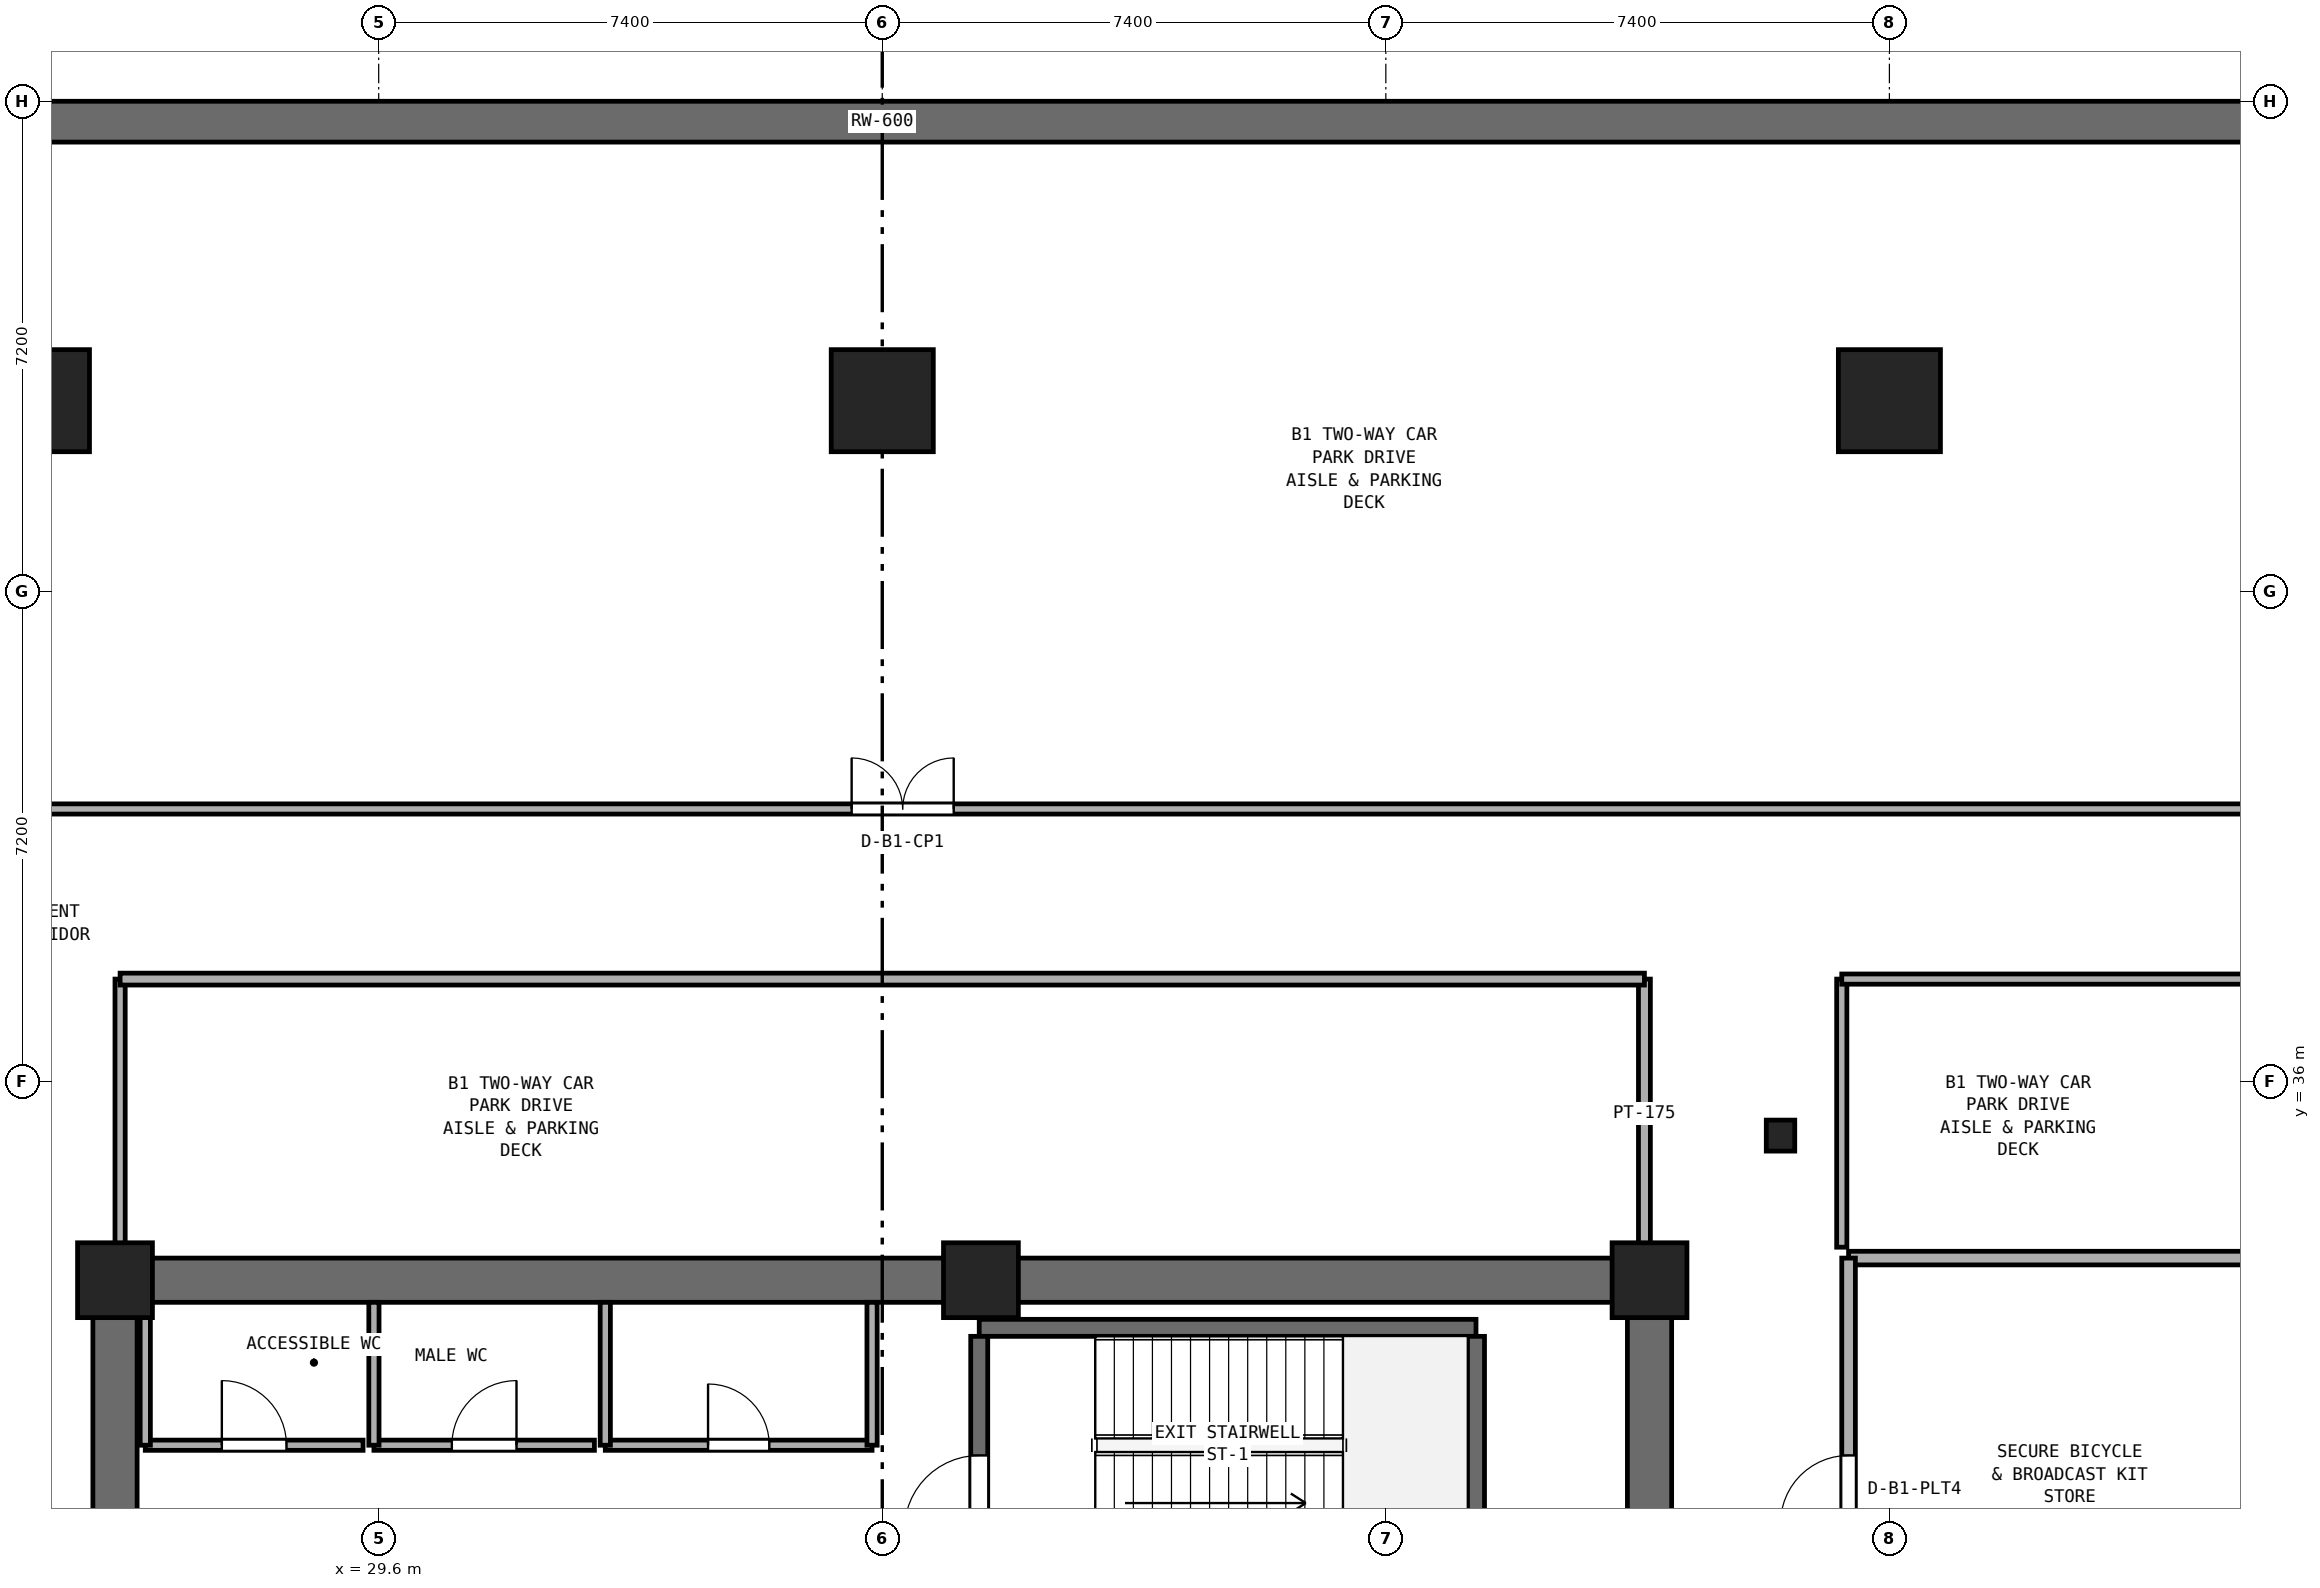
"""IFC4 building model, lengths in metres.
Left out: names, types, materials, properties, quantities, classifications, styles, units other than length and angle.
Written with IfcOpenShell. Run it as: python <this file> out.ifc"""

import sys

from ifc_helpers import new_model, si_unit, direction, frame, frame_2d, origin, origin_2d, place, context, subcontext, project, spatial, rectangle, i_section, extrude, element, fill, save


model = new_model("IFC4")
c1 = context("Model", 3, precision=1e-05, world=origin(), true_north=direction((0.0, 1.0)))
c2 = subcontext(c1, "Body", "Model", "MODEL_VIEW")
j1 = project(units=[si_unit("LENGTHUNIT", "METRE"), si_unit("PLANEANGLEUNIT", "RADIAN")], contexts=[c1])
p1 = place(None, origin())
s1 = spatial("IfcSite", under=j1, at=p1, CompositionType="ELEMENT")
p2 = place(p1, origin())
s2 = spatial("IfcBuilding", under=s1, at=p2, CompositionType="ELEMENT")
p3 = place(p2, frame((0.0, 0.0, -4.8)))
s3 = spatial("IfcBuildingStorey", under=s2, at=p3, CompositionType="ELEMENT", Elevation=-4.8)
p4 = place(p3, frame((25.4, 33.075, 0.0), z_axis=(0.0, 0.0, 1.0), x_axis=(1.0, 0.0, 0.0)))
e1 = element("IfcWall", 1, at=p4, inside=s3, PredefinedType="SHEAR", context=c2, shape_type="SweptSolid", body=[
    extrude(rectangle(XDim=23.2, YDim=0.65, at=frame_2d((11.6, 0.0))), origin(), (0.0, 0.0, 1.0), 4.45),
])
p5 = place(p3, frame((25.725, 17.65, 0.0), z_axis=(0.0, 0.0, 1.0), x_axis=(0.0, 1.0, 0.0)))
e2 = element("IfcWall", 2, at=p5, inside=s3, PredefinedType="SHEAR", context=c2, shape_type="SweptSolid", body=[
    extrude(rectangle(XDim=15.1, YDim=0.65, at=frame_2d((7.55, 0.0))), origin(), (0.0, 0.0, 1.0), 4.45),
])
p6 = place(p5, frame((6.8, 0.0, 0.0)))
e3 = element("IfcOpeningElement", 3, at=p6, cuts=e2, PredefinedType="OPENING", context=c2, shape_type="SweptSolid", body=[
    extrude(rectangle(XDim=1.5, YDim=2.15, at=frame_2d((0.75, 1.075))), frame((0.0, 0.335, 0.0), z_axis=(0.0, -1.0, 0.0), x_axis=(1.0, 0.0, 0.0)), (0.0, 0.0, 1.0), 0.67),
])
p7 = place(p3, frame((48.275, 17.65, 0.0), z_axis=(0.0, 0.0, 1.0), x_axis=(0.0, 1.0, 0.0)))
e4 = element("IfcWall", 4, at=p7, inside=s3, PredefinedType="SHEAR", context=c2, shape_type="SweptSolid", body=[
    extrude(rectangle(XDim=15.1, YDim=0.65, at=frame_2d((7.55, 0.0))), origin(), (0.0, 0.0, 1.0), 4.45),
])
p8 = place(p7, frame((5.65, 0.0, 0.0)))
e5 = element("IfcOpeningElement", 5, at=p8, cuts=e4, PredefinedType="OPENING", context=c2, shape_type="SweptSolid", body=[
    extrude(rectangle(XDim=1.5, YDim=2.15, at=frame_2d((0.75, 1.075))), frame((0.0, 0.335, 0.0), z_axis=(0.0, -1.0, 0.0), x_axis=(1.0, 0.0, 0.0)), (0.0, 0.0, 1.0), 0.67),
])
p9 = place(p3, frame((0.0, 50.1, 0.0), z_axis=(0.0, 0.0, 1.0), x_axis=(1.0, 0.0, 0.0)))
e6 = element("IfcWall", 6, at=p9, inside=s3, PredefinedType="SOLIDWALL", context=c2, shape_type="SweptSolid", body=[
    extrude(rectangle(XDim=74.0, YDim=0.6, at=frame_2d((37.0, 0.0))), origin(), (0.0, 0.0, 1.0), 4.45),
])
for number, where, z_axis, x_axis in (
    (7, (48.275, 33.075, 0.0), (0.0, 0.0, 1.0), (1.0, 0.0, 0.0)),
    (8, (38.45, 33.075, 0.0), (0.0, 0.0, 1.0), (1.0, 0.0, 0.0)),
    (9, (25.725, 33.075, 0.0), (0.0, 0.0, 1.0), (1.0, 0.0, 0.0)),
):
    element("IfcColumn", number, at=place(p3, frame(where, z_axis=z_axis, x_axis=x_axis)), inside=s3, PredefinedType="PILASTER", context=c2, shape_type="SweptSolid", body=[
        extrude(rectangle(XDim=1.1, YDim=1.1, at=origin_2d()), origin(), (0.0, 0.0, 1.0), 4.8),
    ])
for number, where, z_axis, x_axis in (
    (10, (24.6, 46.0, 0.0), (0.0, 0.0, 1.0), (1.0, 0.0, 0.0)),
    (11, (37.0, 46.0, 0.0), (0.0, 0.0, 1.0), (1.0, 0.0, 0.0)),
    (12, (51.8, 46.0, 0.0), (0.0, 0.0, 1.0), (1.0, 0.0, 0.0)),
):
    element("IfcColumn", number, at=place(p3, frame(where, z_axis=z_axis, x_axis=x_axis)), inside=s3, PredefinedType="COLUMN", context=c2, shape_type="SweptSolid", body=[
        extrude(rectangle(XDim=1.5, YDim=1.5, at=origin_2d()), origin(), (0.0, 0.0, 1.0), 4.8),
    ])
p10 = place(p3, frame((50.2, 35.2, 0.0), z_axis=(0.0, 0.0, 1.0), x_axis=(1.0, 0.0, 0.0)))
e13 = element("IfcColumn", 13, at=p10, inside=s3, PredefinedType="COLUMN", context=c2, shape_type="SweptSolid", body=[
    extrude(i_section(OverallWidth=0.418, OverallDepth=0.456, WebThickness=0.042, FlangeThickness=0.067, at=origin_2d()), origin(), (0.0, 0.0, 1.0), 4.8),
])
p11 = place(p3, frame((38.425, 32.375, 0.0), z_axis=(0.0, 0.0, 1.0), x_axis=(1.0, 0.0, 0.0)))
e14 = element("IfcWall", 14, at=p11, inside=s3, PredefinedType="SHEAR", context=c2, shape_type="SweptSolid", body=[
    extrude(rectangle(XDim=7.3, YDim=0.25, at=frame_2d((3.65, 0.0))), origin(), (0.0, 0.0, 1.0), 4.45),
])
p12 = place(p3, frame((38.425, 29.05, 0.0), z_axis=(0.0, 0.0, 1.0), x_axis=(0.0, 1.0, 0.0)))
e15 = element("IfcWall", 15, at=p12, inside=s3, PredefinedType="SHEAR", context=c2, shape_type="SweptSolid", body=[
    extrude(rectangle(XDim=3.2, YDim=0.25, at=frame_2d((1.6, 0.0))), origin(), (0.0, 0.0, 1.0), 4.45),
])
p13 = place(p12, frame((0.35, 0.0, 0.0)))
e16 = element("IfcOpeningElement", 16, at=p13, cuts=e15, PredefinedType="OPENING", context=c2, shape_type="SweptSolid", body=[
    extrude(rectangle(XDim=1.1, YDim=2.15, at=frame_2d((0.55, 1.075))), frame((0.0, 0.135, 0.0), z_axis=(0.0, -1.0, 0.0), x_axis=(1.0, 0.0, 0.0)), (0.0, 0.0, 1.0), 0.27),
])
p14 = place(p3, frame((45.725, 29.05, 0.0), z_axis=(0.0, 0.0, 1.0), x_axis=(0.0, 1.0, 0.0)))
e17 = element("IfcWall", 17, at=p14, inside=s3, PredefinedType="SHEAR", context=c2, shape_type="SweptSolid", body=[
    extrude(rectangle(XDim=3.2, YDim=0.25, at=frame_2d((1.6, 0.0))), origin(), (0.0, 0.0, 1.0), 4.45),
])
p15 = place(p3, frame((26.17, 30.65, 0.0), z_axis=(0.0, 0.0, 1.0), x_axis=(1.0, 0.0, 0.0)))
e18 = element("IfcWall", 18, at=p15, inside=s3, PredefinedType="PARTITIONING", context=c2, shape_type="SweptSolid", body=[
    extrude(rectangle(XDim=3.2, YDim=0.15, at=frame_2d((1.6, 0.0))), origin(), (0.0, 0.0, 1.0), 4.45),
])
p16 = place(p15, frame((1.125, 0.0, 0.0)))
e19 = element("IfcOpeningElement", 19, at=p16, cuts=e18, PredefinedType="OPENING", context=c2, shape_type="SweptSolid", body=[
    extrude(rectangle(XDim=0.95, YDim=2.1, at=frame_2d((0.475, 1.05))), frame((0.0, 0.085, 0.0), z_axis=(0.0, -1.0, 0.0), x_axis=(1.0, 0.0, 0.0)), (0.0, 0.0, 1.0), 0.17),
])
p17 = place(p3, frame((26.17, 30.65, 0.0), z_axis=(0.0, 0.0, 1.0), x_axis=(0.0, 1.0, 0.0)))
e20 = element("IfcWall", 20, at=p17, inside=s3, PredefinedType="PARTITIONING", context=c2, shape_type="SweptSolid", body=[
    extrude(rectangle(XDim=2.1, YDim=0.15, at=frame_2d((1.05, 0.0))), origin(), (0.0, 0.0, 1.0), 4.45),
])
p18 = place(p3, frame((29.53, 30.65, 0.0), z_axis=(0.0, 0.0, 1.0), x_axis=(1.0, 0.0, 0.0)))
e21 = element("IfcWall", 21, at=p18, inside=s3, PredefinedType="PARTITIONING", context=c2, shape_type="SweptSolid", body=[
    extrude(rectangle(XDim=3.24, YDim=0.15, at=frame_2d((1.62, 0.0))), origin(), (0.0, 0.0, 1.0), 4.45),
])
p19 = place(p18, frame((1.145, 0.0, 0.0)))
e22 = element("IfcOpeningElement", 22, at=p19, cuts=e21, PredefinedType="OPENING", context=c2, shape_type="SweptSolid", body=[
    extrude(rectangle(XDim=0.95, YDim=2.1, at=frame_2d((0.475, 1.05))), frame((0.0, 0.085, 0.0), z_axis=(0.0, -1.0, 0.0), x_axis=(1.0, 0.0, 0.0)), (0.0, 0.0, 1.0), 0.17),
])
p20 = place(p3, frame((29.53, 30.65, 0.0), z_axis=(0.0, 0.0, 1.0), x_axis=(0.0, 1.0, 0.0)))
e23 = element("IfcWall", 23, at=p20, inside=s3, PredefinedType="PARTITIONING", context=c2, shape_type="SweptSolid", body=[
    extrude(rectangle(XDim=2.1, YDim=0.15, at=frame_2d((1.05, 0.0))), origin(), (0.0, 0.0, 1.0), 4.45),
])
p21 = place(p3, frame((32.93, 30.65, 0.0), z_axis=(0.0, 0.0, 1.0), x_axis=(1.0, 0.0, 0.0)))
e24 = element("IfcWall", 24, at=p21, inside=s3, PredefinedType="PARTITIONING", context=c2, shape_type="SweptSolid", body=[
    extrude(rectangle(XDim=3.92, YDim=0.15, at=frame_2d((1.96, 0.0))), origin(), (0.0, 0.0, 1.0), 4.45),
])
p22 = place(p21, frame((1.51, 0.0, 0.0)))
e25 = element("IfcOpeningElement", 25, at=p22, cuts=e24, PredefinedType="OPENING", context=c2, shape_type="SweptSolid", body=[
    extrude(rectangle(XDim=0.9, YDim=2.1, at=frame_2d((0.45, 1.05))), frame((0.0, 0.085, 0.0), z_axis=(0.0, -1.0, 0.0), x_axis=(1.0, 0.0, 0.0)), (0.0, 0.0, 1.0), 0.17),
])
for number, where, z_axis, x_axis in (
    (26, (32.93, 30.65, 0.0), (0.0, 0.0, 1.0), (0.0, 1.0, 0.0)),
    (27, (36.85, 30.65, 0.0), (0.0, 0.0, 1.0), (0.0, 1.0, 0.0)),
):
    element("IfcWall", number, at=place(p3, frame(where, z_axis=z_axis, x_axis=x_axis)), inside=s3, PredefinedType="PARTITIONING", context=c2, shape_type="SweptSolid", body=[
        extrude(rectangle(XDim=2.1, YDim=0.15, at=frame_2d((1.05, 0.0))), origin(), (0.0, 0.0, 1.0), 4.45),
    ])
p23 = place(p3, frame((51.2, 33.4, 0.0), z_axis=(0.0, 0.0, 1.0), x_axis=(1.0, 0.0, 0.0)))
e28 = element("IfcWall", 28, at=p23, inside=s3, PredefinedType="SOLIDWALL", context=c2, shape_type="SweptSolid", body=[
    extrude(rectangle(XDim=6.0, YDim=0.2, at=frame_2d((3.0, 0.0))), origin(), (0.0, 0.0, 1.0), 4.45),
])
p24 = place(p3, frame((51.2, 27.0, 0.0), z_axis=(0.0, 0.0, 1.0), x_axis=(0.0, 1.0, 0.0)))
e29 = element("IfcWall", 29, at=p24, inside=s3, PredefinedType="SOLIDWALL", context=c2, shape_type="SweptSolid", body=[
    extrude(rectangle(XDim=6.4, YDim=0.2, at=frame_2d((3.2, 0.0))), origin(), (0.0, 0.0, 1.0), 4.45),
])
p25 = place(p24, frame((2.5, 0.0, 0.0)))
e30 = element("IfcOpeningElement", 30, at=p25, cuts=e29, PredefinedType="OPENING", context=c2, shape_type="SweptSolid", body=[
    extrude(rectangle(XDim=1.0, YDim=2.12, at=frame_2d((0.5, 1.06))), frame((0.0, 0.11, 0.0), z_axis=(0.0, -1.0, 0.0), x_axis=(1.0, 0.0, 0.0)), (0.0, 0.0, 1.0), 0.22),
])
p26 = place(p3, frame((51.1, 33.56, 0.0), z_axis=(0.0, 0.0, 1.0), x_axis=(0.0, 1.0, 0.0)))
e31 = element("IfcWall", 31, at=p26, inside=s3, PredefinedType="PARTITIONING", context=c2, shape_type="SweptSolid", body=[
    extrude(rectangle(XDim=3.94, YDim=0.15, at=frame_2d((1.97, 0.0))), origin(), (0.0, 0.0, 1.0), 4.45),
])
p27 = place(p3, frame((48.2, 33.54, 0.0), z_axis=(0.0, 0.0, 1.0), x_axis=(0.0, 1.0, 0.0)))
e32 = element("IfcWall", 32, at=p27, inside=s3, PredefinedType="PARTITIONING", context=c2, shape_type="SweptSolid", body=[
    extrude(rectangle(XDim=3.96, YDim=0.175, at=frame_2d((1.98, 0.0))), origin(), (0.0, 0.0, 1.0), 4.45),
])
p28 = place(p3, frame((25.8, 33.54, 0.0), z_axis=(0.0, 0.0, 1.0), x_axis=(0.0, 1.0, 0.0)))
e33 = element("IfcWall", 33, at=p28, inside=s3, PredefinedType="PARTITIONING", context=c2, shape_type="SweptSolid", body=[
    extrude(rectangle(XDim=3.96, YDim=0.15, at=frame_2d((1.98, 0.0))), origin(), (0.0, 0.0, 1.0), 4.45),
])
p29 = place(p3, frame((25.8, 37.5, 0.0), z_axis=(0.0, 0.0, 1.0), x_axis=(1.0, 0.0, 0.0)))
e34 = element("IfcWall", 34, at=p29, inside=s3, PredefinedType="PARTITIONING", context=c2, shape_type="SweptSolid", body=[
    extrude(rectangle(XDim=22.4, YDim=0.175, at=frame_2d((11.2, 0.0))), origin(), (0.0, 0.0, 1.0), 4.45),
])
p30 = place(p3, frame((51.1, 37.5, 0.0), z_axis=(0.0, 0.0, 1.0), x_axis=(1.0, 0.0, 0.0)))
e35 = element("IfcWall", 35, at=p30, inside=s3, PredefinedType="PARTITIONING", context=c2, shape_type="SweptSolid", body=[
    extrude(rectangle(XDim=22.695, YDim=0.15, at=frame_2d((11.347, 0.0))), origin(), (0.0, 0.0, 1.0), 4.45),
])
p31 = place(p3, frame((8.46, 40.0, 0.0), z_axis=(0.0, 0.0, 1.0), x_axis=(1.0, 0.0, 0.0)))
e36 = element("IfcWall", 36, at=p31, inside=s3, PredefinedType="PARTITIONING", context=c2, shape_type="SweptSolid", body=[
    extrude(rectangle(XDim=57.68, YDim=0.15, at=frame_2d((28.84, 0.0))), origin(), (0.0, 0.0, 1.0), 4.45),
])
p32 = place(p31, frame((28.09, 0.0, 0.0)))
e37 = element("IfcOpeningElement", 37, at=p32, cuts=e36, PredefinedType="OPENING", context=c2, shape_type="SweptSolid", body=[
    extrude(rectangle(XDim=1.5, YDim=2.15, at=frame_2d((0.75, 1.075))), frame((0.0, 0.085, 0.0), z_axis=(0.0, -1.0, 0.0), x_axis=(1.0, 0.0, 0.0)), (0.0, 0.0, 1.0), 0.17),
])
p33 = place(p13, origin())
e38 = element("IfcDoor", 38, at=p33, inside=s3, OperationType="SINGLE_SWING_LEFT", PredefinedType="DOOR", context=c2, shape_type="SweptSolid", body=[
    extrude(rectangle(XDim=1.1, YDim=2.15, at=frame_2d((0.55, 1.075))), frame((0.0, 0.025, 0.0), z_axis=(0.0, -1.0, 0.0), x_axis=(1.0, 0.0, 0.0)), (0.0, 0.0, 1.0), 0.05),
])
fill(e16, e38)
p34 = place(p16, origin())
e39 = element("IfcDoor", 39, at=p34, inside=s3, OperationType="SINGLE_SWING_LEFT", PredefinedType="DOOR", context=c2, shape_type="SweptSolid", body=[
    extrude(rectangle(XDim=0.95, YDim=2.1, at=frame_2d((0.475, 1.05))), frame((0.0, 0.025, 0.0), z_axis=(0.0, -1.0, 0.0), x_axis=(1.0, 0.0, 0.0)), (0.0, 0.0, 1.0), 0.05),
])
fill(e19, e39)
p35 = place(p19, origin())
e40 = element("IfcDoor", 40, at=p35, inside=s3, OperationType="SINGLE_SWING_RIGHT", PredefinedType="DOOR", context=c2, shape_type="SweptSolid", body=[
    extrude(rectangle(XDim=0.95, YDim=2.1, at=frame_2d((0.475, 1.05))), frame((0.0, 0.025, 0.0), z_axis=(0.0, -1.0, 0.0), x_axis=(1.0, 0.0, 0.0)), (0.0, 0.0, 1.0), 0.05),
])
fill(e22, e40)
p36 = place(p22, origin())
e41 = element("IfcDoor", 41, at=p36, inside=s3, OperationType="SINGLE_SWING_LEFT", PredefinedType="DOOR", context=c2, shape_type="SweptSolid", body=[
    extrude(rectangle(XDim=0.9, YDim=2.1, at=frame_2d((0.45, 1.05))), frame((0.0, 0.025, 0.0), z_axis=(0.0, -1.0, 0.0), x_axis=(1.0, 0.0, 0.0)), (0.0, 0.0, 1.0), 0.05),
])
fill(e25, e41)
p37 = place(p25, origin())
e42 = element("IfcDoor", 42, at=p37, inside=s3, OperationType="SINGLE_SWING_LEFT", PredefinedType="DOOR", context=c2, shape_type="SweptSolid", body=[
    extrude(rectangle(XDim=1.0, YDim=2.12, at=frame_2d((0.5, 1.06))), frame((0.0, 0.025, 0.0), z_axis=(0.0, -1.0, 0.0), x_axis=(1.0, 0.0, 0.0)), (0.0, 0.0, 1.0), 0.05),
])
fill(e30, e42)
p38 = place(p32, origin())
e43 = element("IfcDoor", 43, at=p38, inside=s3, OperationType="DOUBLE_DOOR_SINGLE_SWING", PredefinedType="DOOR", context=c2, shape_type="SweptSolid", body=[
    extrude(rectangle(XDim=1.5, YDim=2.15, at=frame_2d((0.75, 1.075))), frame((0.0, 0.025, 0.0), z_axis=(0.0, -1.0, 0.0), x_axis=(1.0, 0.0, 0.0)), (0.0, 0.0, 1.0), 0.05),
])
fill(e37, e43)
save(model, sys.argv[1])
